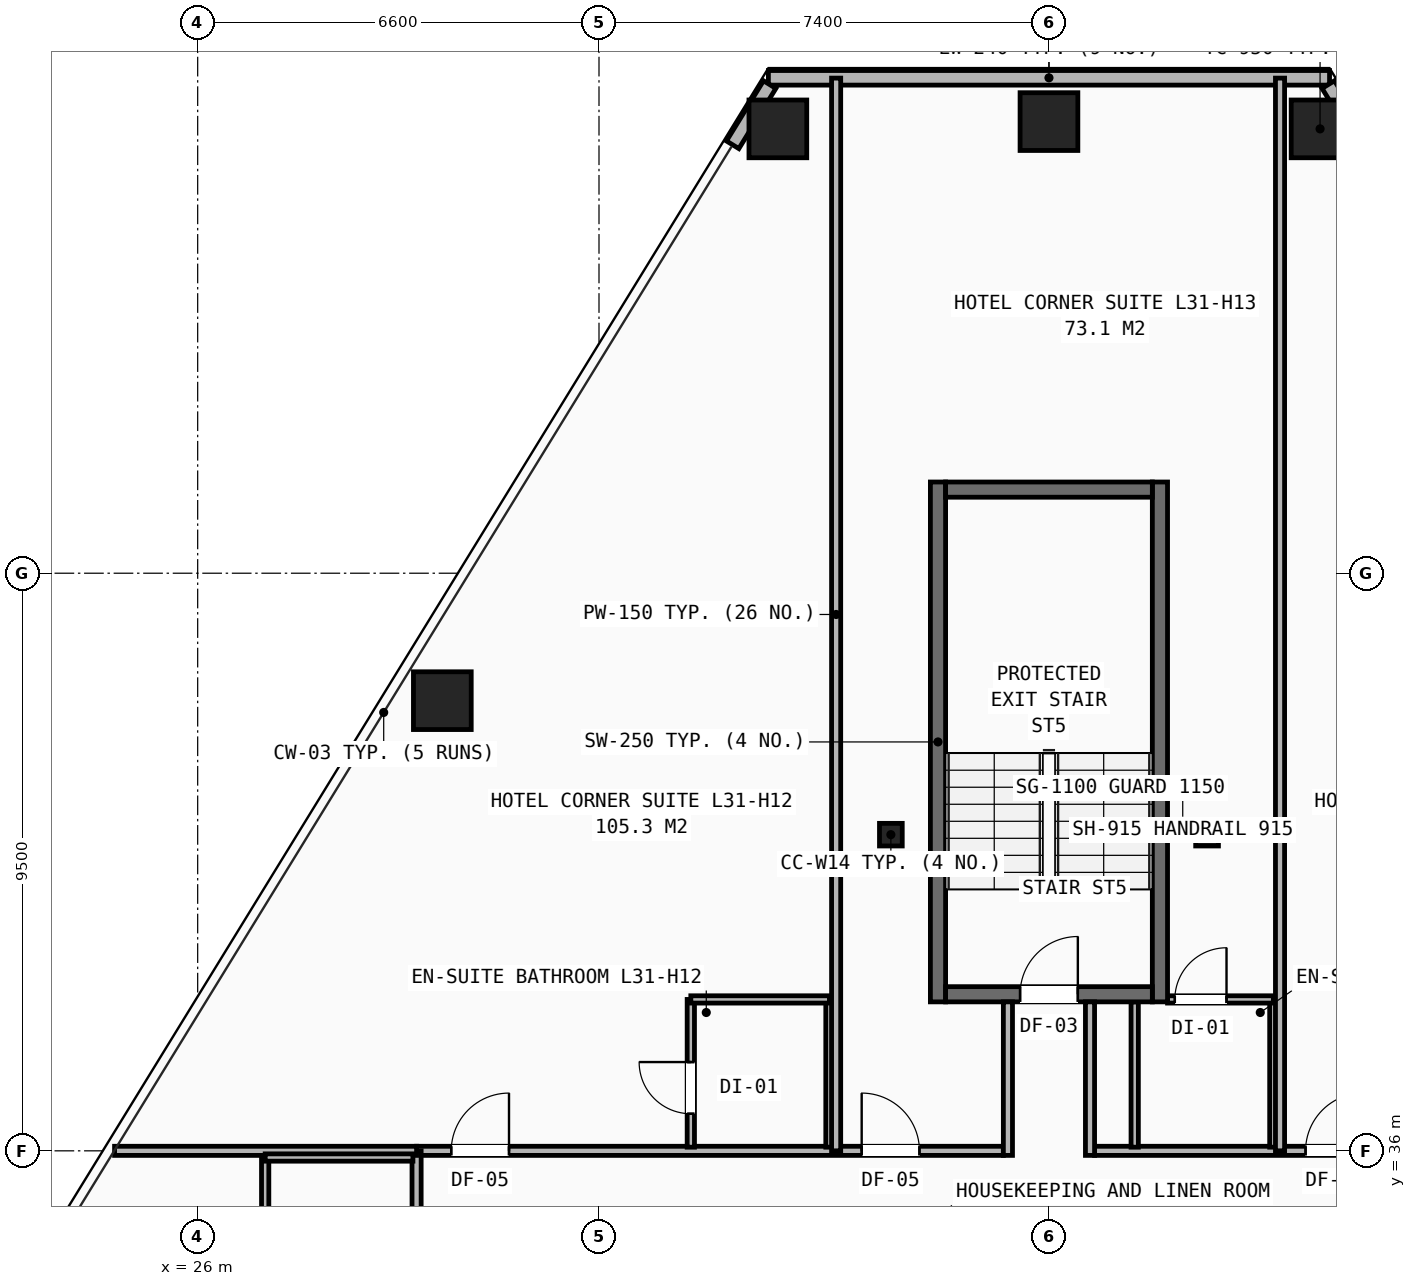
"""IFC4 building model, lengths in metres.
Left out: names, types, materials, properties, quantities, classifications, styles, units other than length and angle.
Written with IfcOpenShell. Run it as: python <this file> out.ifc"""

import sys

from ifc_helpers import new_model, si_unit, direction, frame, frame_2d, origin, origin_2d, place, context, subcontext, project, spatial, rectangle, hollow_rectangle, i_section, extrude, element, fill, save


model = new_model("IFC4")
c1 = context("Model", 3, precision=1e-05, world=origin(), true_north=direction((0.0, 1.0)))
c2 = subcontext(c1, "Body", "Model", "MODEL_VIEW")
j1 = project(units=[si_unit("LENGTHUNIT", "METRE"), si_unit("PLANEANGLEUNIT", "RADIAN")], contexts=[c1])
p1 = place(None, origin())
s1 = spatial("IfcSite", under=j1, at=p1, CompositionType="ELEMENT")
p2 = place(p1, origin())
s2 = spatial("IfcBuilding", under=s1, at=p2, CompositionType="ELEMENT")
p3 = place(p2, frame((0.0, 0.0, 108.6)))
s3 = spatial("IfcBuildingStorey", under=s2, at=p3, CompositionType="ELEMENT", Elevation=108.6)
for number, where, z_axis, x_axis in (
    (1, (37.4, 41.2, 0.0), (0.0, 0.0, 1.0), (1.0, 0.0, 0.0)),
    (2, (42.6, 41.2, 0.0), (0.0, 0.0, 1.0), (1.0, 0.0, 0.0)),
):
    element("IfcColumn", number, at=place(p3, frame(where, z_axis=z_axis, x_axis=x_axis)), inside=s3, PredefinedType="COLUMN", context=c2, shape_type="SweptSolid", body=[
        extrude(i_section(OverallWidth=0.374, OverallDepth=0.372, WebThickness=0.016, FlangeThickness=0.026, at=origin_2d()), origin(), (0.0, 0.0, 1.0), 3.2),
    ])
for number, where, z_axis, x_axis in (
    (3, (44.458, 52.808, 0.0), (0.0, 0.0, 1.0), (1.0, 0.0, 0.0)),
    (4, (40.0, 52.928, 0.0), (0.0, 0.0, 1.0), (1.0, 0.0, 0.0)),
    (5, (35.542, 52.808, 0.0), (0.0, 0.0, 1.0), (1.0, 0.0, 0.0)),
    (6, (30.023, 43.404, 0.0), (0.0, 0.0, 1.0), (1.0, 0.0, 0.0)),
):
    element("IfcColumn", number, at=place(p3, frame(where, z_axis=z_axis, x_axis=x_axis)), inside=s3, PredefinedType="COLUMN", context=c2, shape_type="SweptSolid", body=[
        extrude(hollow_rectangle(XDim=0.95, YDim=0.95, WallThickness=0.065, at=origin_2d()), origin(), (0.0, 0.0, 1.0), 3.2),
    ])
p4 = place(p3, frame((35.386, 53.648, 0.0), z_axis=(0.0, 0.0, 1.0), x_axis=(1.0, 0.0, 0.0)))
e7 = element("IfcWall", 7, at=p4, inside=s3, PredefinedType="SHEAR", context=c2, shape_type="SweptSolid", body=[
    extrude(rectangle(XDim=9.229, YDim=0.24, at=frame_2d((4.614, 0.0))), origin(), (0.0, 0.0, 1.0), 2.223),
])
for number, where, z_axis, x_axis in (
    (8, (35.407, 53.537, 0.0), (0.0, 0.0, 1.0), (-0.524, -0.852, 0.0)),
    (9, (45.202, 52.546, 0.0), (0.0, 0.0, 1.0), (-0.524, 0.852, 0.0)),
):
    element("IfcWall", number, at=place(p3, frame(where, z_axis=z_axis, x_axis=x_axis)), inside=s3, PredefinedType="SHEAR", context=c2, shape_type="SweptSolid", body=[
        extrude(rectangle(XDim=1.163, YDim=0.24, at=frame_2d((0.581, 0.0))), origin(), (0.0, 0.0, 1.0), 2.223),
    ])
p5 = place(p3, frame((29.6, 36.0, 0.0), z_axis=(0.0, 0.0, 1.0), x_axis=(1.0, 0.0, 0.0)))
e10 = element("IfcWall", 10, at=p5, inside=s3, PredefinedType="PARTITIONING", context=c2, shape_type="SweptSolid", body=[
    extrude(rectangle(XDim=9.65, YDim=0.15, at=frame_2d((4.825, 0.0))), origin(), (0.0, 0.0, 1.0), 2.473),
])
p6 = place(p5, frame((0.57, 0.0, 0.0)))
e11 = element("IfcOpeningElement", 11, at=p6, cuts=e10, PredefinedType="OPENING", context=c2, shape_type="SweptSolid", body=[
    extrude(rectangle(XDim=0.95, YDim=2.1, at=frame_2d((0.475, 1.05))), frame((0.0, 0.085, 0.0), z_axis=(0.0, -1.0, 0.0), x_axis=(1.0, 0.0, 0.0)), (0.0, 0.0, 1.0), 0.17),
])
p7 = place(p5, frame((7.32, 0.0, 0.0)))
e12 = element("IfcOpeningElement", 12, at=p7, cuts=e10, PredefinedType="OPENING", context=c2, shape_type="SweptSolid", body=[
    extrude(rectangle(XDim=0.95, YDim=2.1, at=frame_2d((0.475, 1.05))), frame((0.0, 0.085, 0.0), z_axis=(0.0, -1.0, 0.0), x_axis=(1.0, 0.0, 0.0)), (0.0, 0.0, 1.0), 0.17),
])
p8 = place(p3, frame((40.75, 36.0, 0.0), z_axis=(0.0, 0.0, 1.0), x_axis=(1.0, 0.0, 0.0)))
e13 = element("IfcWall", 13, at=p8, inside=s3, PredefinedType="PARTITIONING", context=c2, shape_type="SweptSolid", body=[
    extrude(rectangle(XDim=9.65, YDim=0.15, at=frame_2d((4.825, 0.0))), origin(), (0.0, 0.0, 1.0), 2.473),
])
p9 = place(p8, frame((3.47, 0.0, 0.0)))
e14 = element("IfcOpeningElement", 14, at=p9, cuts=e13, PredefinedType="OPENING", context=c2, shape_type="SweptSolid", body=[
    extrude(rectangle(XDim=0.95, YDim=2.1, at=frame_2d((0.475, 1.05))), frame((0.0, 0.085, 0.0), z_axis=(0.0, -1.0, 0.0), x_axis=(1.0, 0.0, 0.0)), (0.0, 0.0, 1.0), 0.17),
])
p10 = place(p3, frame((29.6, 14.1, 0.0), z_axis=(0.0, 0.0, 1.0), x_axis=(0.0, 1.0, 0.0)))
e15 = element("IfcWall", 15, at=p10, inside=s3, PredefinedType="PARTITIONING", context=c2, shape_type="SweptSolid", body=[
    extrude(rectangle(XDim=21.9, YDim=0.15, at=frame_2d((10.95, 0.0))), origin(), (0.0, 0.0, 1.0), 2.151),
])
p11 = place(p10, frame((0.42, 0.0, 0.0)))
e16 = element("IfcOpeningElement", 16, at=p11, cuts=e15, PredefinedType="OPENING", context=c2, shape_type="SweptSolid", body=[
    extrude(rectangle(XDim=0.95, YDim=2.1, at=frame_2d((0.475, 1.05))), frame((0.0, 0.085, 0.0), z_axis=(0.0, -1.0, 0.0), x_axis=(1.0, 0.0, 0.0)), (0.0, 0.0, 1.0), 0.17),
])
p12 = place(p10, frame((5.12, 0.0, 0.0)))
e17 = element("IfcOpeningElement", 17, at=p12, cuts=e15, PredefinedType="OPENING", context=c2, shape_type="SweptSolid", body=[
    extrude(rectangle(XDim=0.95, YDim=2.1, at=frame_2d((0.475, 1.05))), frame((0.0, 0.085, 0.0), z_axis=(0.0, -1.0, 0.0), x_axis=(1.0, 0.0, 0.0)), (0.0, 0.0, 1.0), 0.17),
])
p13 = place(p10, frame((10.32, 0.0, 0.0)))
e18 = element("IfcOpeningElement", 18, at=p13, cuts=e15, PredefinedType="OPENING", context=c2, shape_type="SweptSolid", body=[
    extrude(rectangle(XDim=0.95, YDim=2.1, at=frame_2d((0.475, 1.05))), frame((0.0, 0.085, 0.0), z_axis=(0.0, -1.0, 0.0), x_axis=(1.0, 0.0, 0.0)), (0.0, 0.0, 1.0), 0.17),
])
p14 = place(p10, frame((16.12, 0.0, 0.0)))
e19 = element("IfcOpeningElement", 19, at=p14, cuts=e15, PredefinedType="OPENING", context=c2, shape_type="SweptSolid", body=[
    extrude(rectangle(XDim=0.95, YDim=2.1, at=frame_2d((0.475, 1.05))), frame((0.0, 0.085, 0.0), z_axis=(0.0, -1.0, 0.0), x_axis=(1.0, 0.0, 0.0)), (0.0, 0.0, 1.0), 0.17),
])
p15 = place(p3, frame((24.633, 36.0, 0.0), z_axis=(0.0, 0.0, 1.0), x_axis=(1.0, 0.0, 0.0)))
e20 = element("IfcWall", 20, at=p15, inside=s3, PredefinedType="PARTITIONING", context=c2, shape_type="SweptSolid", body=[
    extrude(rectangle(XDim=4.967, YDim=0.15, at=frame_2d((2.483, 0.0))), origin(), (0.0, 0.0, 1.0), 2.228),
])
p16 = place(p3, frame((27.11, 33.61, 0.0), z_axis=(0.0, 0.0, 1.0), x_axis=(0.0, 1.0, 0.0)))
e21 = element("IfcWall", 21, at=p16, inside=s3, PredefinedType="PARTITIONING", context=c2, shape_type="SweptSolid", body=[
    extrude(rectangle(XDim=2.28, YDim=0.12, at=frame_2d((1.14, 0.0))), origin(), (0.0, 0.0, 1.0), 2.94),
])
p17 = place(p3, frame((27.11, 35.89, 0.0), z_axis=(0.0, 0.0, 1.0), x_axis=(1.0, 0.0, 0.0)))
e22 = element("IfcWall", 22, at=p17, inside=s3, PredefinedType="PARTITIONING", context=c2, shape_type="SweptSolid", body=[
    extrude(rectangle(XDim=2.43, YDim=0.12, at=frame_2d((1.215, 0.0))), origin(), (0.0, 0.0, 1.0), 2.473),
])
p18 = place(p3, frame((34.11, 36.06, 0.0), z_axis=(0.0, 0.0, 1.0), x_axis=(0.0, 1.0, 0.0)))
e23 = element("IfcWall", 23, at=p18, inside=s3, PredefinedType="PARTITIONING", context=c2, shape_type="SweptSolid", body=[
    extrude(rectangle(XDim=2.43, YDim=0.12, at=frame_2d((1.215, 0.0))), origin(), (0.0, 0.0, 1.0), 2.94),
])
p19 = place(p18, frame((0.55, 0.0, 0.0)))
e24 = element("IfcOpeningElement", 24, at=p19, cuts=e23, PredefinedType="OPENING", context=c2, shape_type="SweptSolid", body=[
    extrude(rectangle(XDim=0.85, YDim=2.05, at=frame_2d((0.425, 1.025))), frame((0.0, 0.07, 0.0), z_axis=(0.0, -1.0, 0.0), x_axis=(1.0, 0.0, 0.0)), (0.0, 0.0, 1.0), 0.14),
])
p20 = place(p3, frame((36.39, 36.06, 0.0), z_axis=(0.0, 0.0, 1.0), x_axis=(0.0, 1.0, 0.0)))
e25 = element("IfcWall", 25, at=p20, inside=s3, PredefinedType="PARTITIONING", context=c2, shape_type="SweptSolid", body=[
    extrude(rectangle(XDim=2.43, YDim=0.12, at=frame_2d((1.215, 0.0))), origin(), (0.0, 0.0, 1.0), 2.94),
])
p21 = place(p3, frame((34.11, 38.49, 0.0), z_axis=(0.0, 0.0, 1.0), x_axis=(1.0, 0.0, 0.0)))
e26 = element("IfcWall", 26, at=p21, inside=s3, PredefinedType="PARTITIONING", context=c2, shape_type="SweptSolid", body=[
    extrude(rectangle(XDim=2.28, YDim=0.12, at=frame_2d((1.14, 0.0))), origin(), (0.0, 0.0, 1.0), 2.94),
])
p22 = place(p3, frame((36.5, 36.0, 0.0), z_axis=(0.0, 0.0, 1.0), x_axis=(0.0, 1.0, 0.0)))
e27 = element("IfcWall", 27, at=p22, inside=s3, PredefinedType="PARTITIONING", context=c2, shape_type="SweptSolid", body=[
    extrude(rectangle(XDim=17.643, YDim=0.15, at=frame_2d((8.821, 0.0))), origin(), (0.0, 0.0, 1.0), 2.151),
])
p23 = place(p3, frame((41.41, 36.06, 0.0), z_axis=(0.0, 0.0, 1.0), x_axis=(0.0, 1.0, 0.0)))
e28 = element("IfcWall", 28, at=p23, inside=s3, PredefinedType="PARTITIONING", context=c2, shape_type="SweptSolid", body=[
    extrude(rectangle(XDim=2.39, YDim=0.12, at=frame_2d((1.195, 0.0))), origin(), (0.0, 0.0, 1.0), 2.94),
])
p24 = place(p3, frame((43.69, 36.06, 0.0), z_axis=(0.0, 0.0, 1.0), x_axis=(0.0, 1.0, 0.0)))
e29 = element("IfcWall", 29, at=p24, inside=s3, PredefinedType="PARTITIONING", context=c2, shape_type="SweptSolid", body=[
    extrude(rectangle(XDim=2.43, YDim=0.12, at=frame_2d((1.215, 0.0))), origin(), (0.0, 0.0, 1.0), 2.94),
])
p25 = place(p3, frame((41.95, 38.49, 0.0), z_axis=(0.0, 0.0, 1.0), x_axis=(1.0, 0.0, 0.0)))
e30 = element("IfcWall", 30, at=p25, inside=s3, PredefinedType="PARTITIONING", context=c2, shape_type="SweptSolid", body=[
    extrude(rectangle(XDim=1.74, YDim=0.12, at=frame_2d((0.87, 0.0))), origin(), (0.0, 0.0, 1.0), 2.94),
])
p26 = place(p25, frame((0.12, 0.0, 0.0)))
e31 = element("IfcOpeningElement", 31, at=p26, cuts=e30, PredefinedType="OPENING", context=c2, shape_type="SweptSolid", body=[
    extrude(rectangle(XDim=0.85, YDim=2.05, at=frame_2d((0.425, 1.025))), frame((0.0, 0.07, 0.0), z_axis=(0.0, -1.0, 0.0), x_axis=(1.0, 0.0, 0.0)), (0.0, 0.0, 1.0), 0.14),
])
p27 = place(p3, frame((43.8, 36.0, 0.0), z_axis=(0.0, 0.0, 1.0), x_axis=(0.0, 1.0, 0.0)))
e32 = element("IfcWall", 32, at=p27, inside=s3, PredefinedType="PARTITIONING", context=c2, shape_type="SweptSolid", body=[
    extrude(rectangle(XDim=17.643, YDim=0.15, at=frame_2d((8.821, 0.0))), origin(), (0.0, 0.0, 1.0), 2.151),
])
for number, where, z_axis, x_axis in (
    (33, (38.175, 38.45, 0.0), (0.0, 0.0, 1.0), (0.0, 1.0, 0.0)),
    (34, (41.825, 38.45, 0.0), (0.0, 0.0, 1.0), (0.0, 1.0, 0.0)),
):
    element("IfcWall", number, at=place(p3, frame(where, z_axis=z_axis, x_axis=x_axis)), inside=s3, PredefinedType="SHEAR", context=c2, shape_type="SweptSolid", body=[
        extrude(rectangle(XDim=8.55, YDim=0.25, at=frame_2d((4.275, 0.0))), origin(), (0.0, 0.0, 1.0), 2.94),
    ])
p28 = place(p3, frame((38.3, 38.575, 0.0), z_axis=(0.0, 0.0, 1.0), x_axis=(1.0, 0.0, 0.0)))
e35 = element("IfcWall", 35, at=p28, inside=s3, PredefinedType="SHEAR", context=c2, shape_type="SweptSolid", body=[
    extrude(rectangle(XDim=3.4, YDim=0.25, at=frame_2d((1.7, 0.0))), origin(), (0.0, 0.0, 1.0), 2.94),
])
p29 = place(p28, frame((1.225, 0.0, 0.0)))
e36 = element("IfcOpeningElement", 36, at=p29, cuts=e35, PredefinedType="OPENING", context=c2, shape_type="SweptSolid", body=[
    extrude(rectangle(XDim=0.95, YDim=2.1, at=frame_2d((0.475, 1.05))), frame((0.0, 0.135, 0.0), z_axis=(0.0, -1.0, 0.0), x_axis=(1.0, 0.0, 0.0)), (0.0, 0.0, 1.0), 0.27),
])
p30 = place(p3, frame((38.3, 46.875, 0.0), z_axis=(0.0, 0.0, 1.0), x_axis=(1.0, 0.0, 0.0)))
e37 = element("IfcWall", 37, at=p30, inside=s3, PredefinedType="SHEAR", context=c2, shape_type="SweptSolid", body=[
    extrude(rectangle(XDim=3.4, YDim=0.25, at=frame_2d((1.7, 0.0))), origin(), (0.0, 0.0, 1.0), 2.94),
])
for number, where, z_axis, x_axis in (
    (38, (39.325, 35.925, 0.0), (0.0, 0.0, 1.0), (0.0, 1.0, 0.0)),
    (39, (40.675, 35.925, 0.0), (0.0, 0.0, 1.0), (0.0, 1.0, 0.0)),
):
    element("IfcWall", number, at=place(p3, frame(where, z_axis=z_axis, x_axis=x_axis)), inside=s3, PredefinedType="PARTITIONING", context=c2, shape_type="SweptSolid", body=[
        extrude(rectangle(XDim=2.525, YDim=0.15, at=frame_2d((1.262, 0.0))), origin(), (0.0, 0.0, 1.0), 2.94),
    ])
p31 = place(p6, origin())
e40 = element("IfcDoor", 40, at=p31, inside=s3, OperationType="SINGLE_SWING_RIGHT", PredefinedType="DOOR", context=c2, shape_type="SweptSolid", body=[
    extrude(rectangle(XDim=0.95, YDim=2.1, at=frame_2d((0.475, 1.05))), frame((0.0, 0.025, 0.0), z_axis=(0.0, -1.0, 0.0), x_axis=(1.0, 0.0, 0.0)), (0.0, 0.0, 1.0), 0.05),
])
fill(e11, e40)
p32 = place(p19, origin())
e41 = element("IfcDoor", 41, at=p32, inside=s3, OperationType="SINGLE_SWING_RIGHT", PredefinedType="DOOR", context=c2, shape_type="SweptSolid", body=[
    extrude(rectangle(XDim=0.85, YDim=2.05, at=frame_2d((0.425, 1.025))), frame((0.0, 0.025, 0.0), z_axis=(0.0, -1.0, 0.0), x_axis=(1.0, 0.0, 0.0)), (0.0, 0.0, 1.0), 0.05),
])
fill(e24, e41)
p33 = place(p7, origin())
e42 = element("IfcDoor", 42, at=p33, inside=s3, OperationType="SINGLE_SWING_LEFT", PredefinedType="DOOR", context=c2, shape_type="SweptSolid", body=[
    extrude(rectangle(XDim=0.95, YDim=2.1, at=frame_2d((0.475, 1.05))), frame((0.0, 0.025, 0.0), z_axis=(0.0, -1.0, 0.0), x_axis=(1.0, 0.0, 0.0)), (0.0, 0.0, 1.0), 0.05),
])
fill(e12, e42)
p34 = place(p26, origin())
e43 = element("IfcDoor", 43, at=p34, inside=s3, OperationType="SINGLE_SWING_RIGHT", PredefinedType="DOOR", context=c2, shape_type="SweptSolid", body=[
    extrude(rectangle(XDim=0.85, YDim=2.05, at=frame_2d((0.425, 1.025))), frame((0.0, 0.025, 0.0), z_axis=(0.0, -1.0, 0.0), x_axis=(1.0, 0.0, 0.0)), (0.0, 0.0, 1.0), 0.05),
])
fill(e31, e43)
p35 = place(p9, origin())
e44 = element("IfcDoor", 44, at=p35, inside=s3, OperationType="SINGLE_SWING_RIGHT", PredefinedType="DOOR", context=c2, shape_type="SweptSolid", body=[
    extrude(rectangle(XDim=0.95, YDim=2.1, at=frame_2d((0.475, 1.05))), frame((0.0, 0.025, 0.0), z_axis=(0.0, -1.0, 0.0), x_axis=(1.0, 0.0, 0.0)), (0.0, 0.0, 1.0), 0.05),
])
fill(e14, e44)
p36 = place(p29, origin())
e45 = element("IfcDoor", 45, at=p36, inside=s3, OperationType="SINGLE_SWING_RIGHT", PredefinedType="DOOR", context=c2, shape_type="SweptSolid", body=[
    extrude(rectangle(XDim=0.95, YDim=2.1, at=frame_2d((0.475, 1.05))), frame((0.0, 0.025, 0.0), z_axis=(0.0, -1.0, 0.0), x_axis=(1.0, 0.0, 0.0)), (0.0, 0.0, 1.0), 0.05),
])
fill(e36, e45)
save(model, sys.argv[1])
